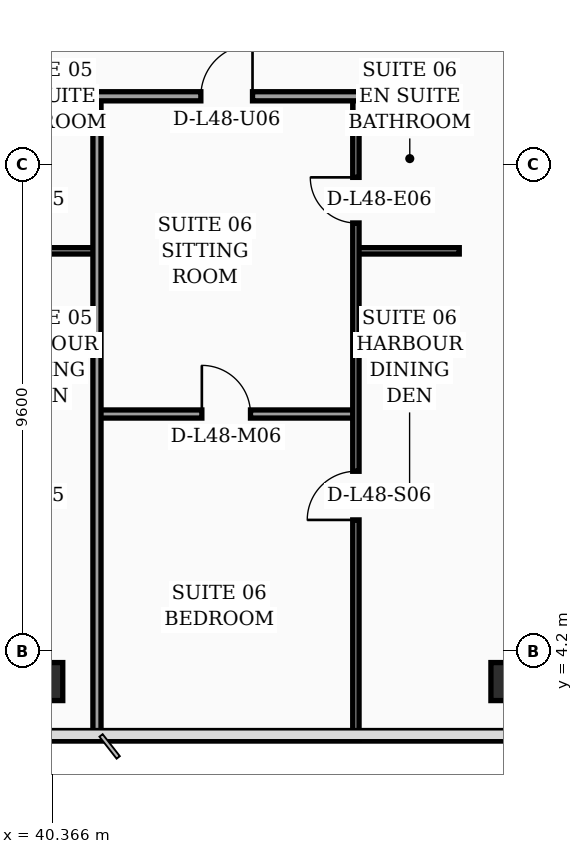
"""IFC4 building model, lengths in metres.
Left out: names, types, materials, properties, quantities, classifications, styles, units other than length and angle.
Written with IfcOpenShell. Run it as: python <this file> out.ifc"""

import sys

from ifc_helpers import new_model, si_unit, direction, frame, frame_2d, origin, origin_2d, place, context, subcontext, project, spatial, rectangle, hollow_rectangle, extrude, element, fill, save


model = new_model("IFC4")
c1 = context("Model", 3, precision=1e-05, world=origin(), true_north=direction((0.0, 1.0)))
c2 = subcontext(c1, "Body", "Model", "MODEL_VIEW")
j1 = project(units=[si_unit("LENGTHUNIT", "METRE"), si_unit("PLANEANGLEUNIT", "RADIAN")], contexts=[c1])
p1 = place(None, origin())
s1 = spatial("IfcSite", under=j1, at=p1, CompositionType="ELEMENT")
p2 = place(p1, origin())
s2 = spatial("IfcBuilding", under=s1, at=p2, CompositionType="ELEMENT")
p3 = place(p2, frame((0.0, 0.0, 195.1)))
s3 = spatial("IfcBuildingStorey", under=s2, at=p3, CompositionType="ELEMENT", Elevation=195.1)
for number, where, z_axis, x_axis in (
    (1, (40.2, 3.6, 0.0), (0.0, 0.0, 1.0), (1.0, 0.0, 0.0)),
    (2, (49.4, 3.6, 0.0), (0.0, 0.0, 1.0), (1.0, 0.0, 0.0)),
):
    element("IfcColumn", number, at=place(p3, frame(where, z_axis=z_axis, x_axis=x_axis)), inside=s3, PredefinedType="COLUMN", context=c2, shape_type="SweptSolid", body=[
        extrude(hollow_rectangle(XDim=0.75, YDim=0.75, WallThickness=0.032, at=origin_2d()), origin(), (0.0, 0.0, 1.0), 4.05),
    ])
p4 = place(p3, frame((55.03, 5.505, 0.0), z_axis=(0.0, 0.0, 1.0), x_axis=(-0.300509063924, 0.953778958931, 0.0)))
e3 = element("IfcWall", 3, at=p4, inside=s3, PredefinedType="SOLIDWALL", context=c2, shape_type="SweptSolid", body=[
    extrude(rectangle(XDim=30.814, YDim=0.32, at=frame_2d((15.407, 0.0))), origin(), (0.0, 0.0, 1.0), 4.05),
])
p5 = place(p4, frame((4.747, 0.0, 0.0)))
e4 = element("IfcOpeningElement", 4, at=p5, cuts=e3, PredefinedType="OPENING", context=c2, shape_type="SweptSolid", body=[
    extrude(rectangle(XDim=1.4, YDim=2.25, at=frame_2d((0.7, 1.125))), frame((0.0, 0.17, 0.0), z_axis=(0.0, -1.0, 0.0), x_axis=(1.0, 0.0, 0.0)), (0.0, 0.0, 1.0), 0.34),
])
p6 = place(p4, frame((9.889, 0.0, 0.7)))
e5 = element("IfcOpeningElement", 5, at=p6, cuts=e3, PredefinedType="OPENING", context=c2, shape_type="SweptSolid", body=[
    extrude(rectangle(XDim=1.6, YDim=1.65, at=frame_2d((0.8, 0.825))), frame((0.0, 0.17, 0.0), z_axis=(0.0, -1.0, 0.0), x_axis=(1.0, 0.0, 0.0)), (0.0, 0.0, 1.0), 0.34),
])
p7 = place(p4, frame((18.696, 0.0, 0.7)))
e6 = element("IfcOpeningElement", 6, at=p7, cuts=e3, PredefinedType="OPENING", context=c2, shape_type="SweptSolid", body=[
    extrude(rectangle(XDim=1.6, YDim=1.65, at=frame_2d((0.8, 0.825))), frame((0.0, 0.17, 0.0), z_axis=(0.0, -1.0, 0.0), x_axis=(1.0, 0.0, 0.0)), (0.0, 0.0, 1.0), 0.34),
])
p8 = place(p4, frame((1.6, 0.0, 0.75)))
e7 = element("IfcOpeningElement", 7, at=p8, cuts=e3, PredefinedType="OPENING", context=c2, shape_type="SweptSolid", body=[
    extrude(rectangle(XDim=1.5, YDim=1.6, at=frame_2d((0.75, 0.8))), frame((0.0, 0.17, 0.0), z_axis=(0.0, -1.0, 0.0), x_axis=(1.0, 0.0, 0.0)), (0.0, 0.0, 1.0), 0.34),
])
p9 = place(p4, frame((7.8, 0.0, 0.75)))
e8 = element("IfcOpeningElement", 8, at=p9, cuts=e3, PredefinedType="OPENING", context=c2, shape_type="SweptSolid", body=[
    extrude(rectangle(XDim=1.5, YDim=1.6, at=frame_2d((0.75, 0.8))), frame((0.0, 0.17, 0.0), z_axis=(0.0, -1.0, 0.0), x_axis=(1.0, 0.0, 0.0)), (0.0, 0.0, 1.0), 0.34),
])
p10 = place(p4, frame((11.95, 0.0, 0.75)))
e9 = element("IfcOpeningElement", 9, at=p10, cuts=e3, PredefinedType="OPENING", context=c2, shape_type="SweptSolid", body=[
    extrude(rectangle(XDim=1.5, YDim=1.6, at=frame_2d((0.75, 0.8))), frame((0.0, 0.17, 0.0), z_axis=(0.0, -1.0, 0.0), x_axis=(1.0, 0.0, 0.0)), (0.0, 0.0, 1.0), 0.34),
])
p11 = place(p4, frame((14.0, 0.0, 0.75)))
e10 = element("IfcOpeningElement", 10, at=p11, cuts=e3, PredefinedType="OPENING", context=c2, shape_type="SweptSolid", body=[
    extrude(rectangle(XDim=1.5, YDim=1.6, at=frame_2d((0.75, 0.8))), frame((0.0, 0.17, 0.0), z_axis=(0.0, -1.0, 0.0), x_axis=(1.0, 0.0, 0.0)), (0.0, 0.0, 1.0), 0.34),
])
p12 = place(p4, frame((16.55, 0.0, 0.75)))
e11 = element("IfcOpeningElement", 11, at=p12, cuts=e3, PredefinedType="OPENING", context=c2, shape_type="SweptSolid", body=[
    extrude(rectangle(XDim=1.5, YDim=1.6, at=frame_2d((0.75, 0.8))), frame((0.0, 0.17, 0.0), z_axis=(0.0, -1.0, 0.0), x_axis=(1.0, 0.0, 0.0)), (0.0, 0.0, 1.0), 0.34),
])
p13 = place(p4, frame((20.75, 0.0, 0.75)))
e12 = element("IfcOpeningElement", 12, at=p13, cuts=e3, PredefinedType="OPENING", context=c2, shape_type="SweptSolid", body=[
    extrude(rectangle(XDim=1.5, YDim=1.6, at=frame_2d((0.75, 0.8))), frame((0.0, 0.17, 0.0), z_axis=(0.0, -1.0, 0.0), x_axis=(1.0, 0.0, 0.0)), (0.0, 0.0, 1.0), 0.34),
])
p14 = place(p4, frame((23.3, 0.0, 0.75)))
e13 = element("IfcOpeningElement", 13, at=p14, cuts=e3, PredefinedType="OPENING", context=c2, shape_type="SweptSolid", body=[
    extrude(rectangle(XDim=1.5, YDim=1.6, at=frame_2d((0.75, 0.8))), frame((0.0, 0.17, 0.0), z_axis=(0.0, -1.0, 0.0), x_axis=(1.0, 0.0, 0.0)), (0.0, 0.0, 1.0), 0.34),
])
p15 = place(p4, frame((26.4, 0.0, 0.75)))
e14 = element("IfcOpeningElement", 14, at=p15, cuts=e3, PredefinedType="OPENING", context=c2, shape_type="SweptSolid", body=[
    extrude(rectangle(XDim=1.5, YDim=1.6, at=frame_2d((0.75, 0.8))), frame((0.0, 0.17, 0.0), z_axis=(0.0, -1.0, 0.0), x_axis=(1.0, 0.0, 0.0)), (0.0, 0.0, 1.0), 0.34),
])
p16 = place(p3, frame((39.12, 12.1, 0.0), z_axis=(0.0, 0.0, 1.0), x_axis=(1.0, 0.0, 0.0)))
e15 = element("IfcWall", 15, at=p16, inside=s3, PredefinedType="PARTITIONING", context=c2, shape_type="SweptSolid", body=[
    extrude(rectangle(XDim=2.13, YDim=0.125, at=frame_2d((1.065, 0.0))), origin(), (0.0, 0.0, 1.0), 4.05),
])
p17 = place(p3, frame((46.36, 12.1, 0.0), z_axis=(0.0, 0.0, 1.0), x_axis=(1.0, 0.0, 0.0)))
e16 = element("IfcWall", 16, at=p17, inside=s3, PredefinedType="PARTITIONING", context=c2, shape_type="SweptSolid", body=[
    extrude(rectangle(XDim=2.04, YDim=0.125, at=frame_2d((1.02, 0.0))), origin(), (0.0, 0.0, 1.0), 4.05),
])
p18 = place(p3, frame((41.25, 8.88, 0.0), z_axis=(0.0, 0.0, 1.0), x_axis=(1.0, 0.0, 0.0)))
e17 = element("IfcWall", 17, at=p18, inside=s3, PredefinedType="PARTITIONING", context=c2, shape_type="SweptSolid", body=[
    extrude(rectangle(XDim=5.11, YDim=0.16, at=frame_2d((2.555, 0.0))), origin(), (0.0, 0.0, 1.0), 4.05),
])
p19 = place(p18, frame((2.07, 0.0, 0.0)))
e18 = element("IfcOpeningElement", 18, at=p19, cuts=e17, PredefinedType="OPENING", context=c2, shape_type="SweptSolid", body=[
    extrude(rectangle(XDim=0.96, YDim=2.2, at=frame_2d((0.48, 1.1))), frame((0.0, 0.09, 0.0), z_axis=(0.0, -1.0, 0.0), x_axis=(1.0, 0.0, 0.0)), (0.0, 0.0, 1.0), 0.18),
])
p20 = place(p3, frame((46.36, 2.44, 0.0), z_axis=(0.0, 0.0, 1.0), x_axis=(0.0, 1.0, 0.0)))
e19 = element("IfcWall", 19, at=p20, inside=s3, PredefinedType="PARTITIONING", context=c2, shape_type="SweptSolid", body=[
    extrude(rectangle(XDim=12.71, YDim=0.125, at=frame_2d((6.355, 0.0))), origin(), (0.0, 0.0, 1.0), 2.35),
])
p21 = place(p20, frame((4.35, 0.0, 0.0)))
e20 = element("IfcOpeningElement", 20, at=p21, cuts=e19, PredefinedType="OPENING", context=c2, shape_type="SweptSolid", body=[
    extrude(rectangle(XDim=0.96, YDim=2.2, at=frame_2d((0.48, 1.1))), frame((0.0, 0.073, 0.0), z_axis=(0.0, -1.0, 0.0), x_axis=(1.0, 0.0, 0.0)), (0.0, 0.0, 1.0), 0.145),
])
p22 = place(p20, frame((10.21, 0.0, 0.0)))
e21 = element("IfcOpeningElement", 21, at=p22, cuts=e19, PredefinedType="OPENING", context=c2, shape_type="SweptSolid", body=[
    extrude(rectangle(XDim=0.9, YDim=2.15, at=frame_2d((0.45, 1.075))), frame((0.0, 0.073, 0.0), z_axis=(0.0, -1.0, 0.0), x_axis=(1.0, 0.0, 0.0)), (0.0, 0.0, 1.0), 0.145),
])
p23 = place(p3, frame((41.25, 2.44, 0.0), z_axis=(0.0, 0.0, 1.0), x_axis=(0.0, 1.0, 0.0)))
e22 = element("IfcWall", 22, at=p23, inside=s3, PredefinedType="PARTITIONING", context=c2, shape_type="SweptSolid", body=[
    extrude(rectangle(XDim=12.71, YDim=0.16, at=frame_2d((6.355, 0.0))), origin(), (0.0, 0.0, 1.0), 2.35),
])
p24 = place(p3, frame((32.4, 15.15, 0.0), z_axis=(0.0, 0.0, 1.0), x_axis=(1.0, 0.0, 0.0)))
e23 = element("IfcWall", 23, at=p24, inside=s3, PredefinedType="PARTITIONING", context=c2, shape_type="SweptSolid", body=[
    extrude(rectangle(XDim=16.0, YDim=0.18, at=frame_2d((8.0, 0.0))), origin(), (0.0, 0.0, 1.0), 2.35),
])
p25 = place(p24, frame((2.95, 0.0, 0.0)))
e24 = element("IfcOpeningElement", 24, at=p25, cuts=e23, PredefinedType="OPENING", context=c2, shape_type="SweptSolid", body=[
    extrude(rectangle(XDim=1.02, YDim=2.2, at=frame_2d((0.51, 1.1))), frame((0.0, 0.1, 0.0), z_axis=(0.0, -1.0, 0.0), x_axis=(1.0, 0.0, 0.0)), (0.0, 0.0, 1.0), 0.2),
])
p26 = place(p24, frame((10.9, 0.0, 0.0)))
e25 = element("IfcOpeningElement", 25, at=p26, cuts=e23, PredefinedType="OPENING", context=c2, shape_type="SweptSolid", body=[
    extrude(rectangle(XDim=1.02, YDim=2.2, at=frame_2d((0.51, 1.1))), frame((0.0, 0.1, 0.0), z_axis=(0.0, -1.0, 0.0), x_axis=(1.0, 0.0, 0.0)), (0.0, 0.0, 1.0), 0.2),
])
p27 = place(p19, origin())
e26 = element("IfcDoor", 26, at=p27, inside=s3, OperationType="SINGLE_SWING_LEFT", PredefinedType="DOOR", context=c2, shape_type="SweptSolid", body=[
    extrude(rectangle(XDim=0.96, YDim=2.2, at=frame_2d((0.48, 1.1))), frame((0.0, 0.025, 0.0), z_axis=(0.0, -1.0, 0.0), x_axis=(1.0, 0.0, 0.0)), (0.0, 0.0, 1.0), 0.05),
])
fill(e18, e26)
p28 = place(p21, origin())
e27 = element("IfcDoor", 27, at=p28, inside=s3, OperationType="SINGLE_SWING_LEFT", PredefinedType="DOOR", context=c2, shape_type="SweptSolid", body=[
    extrude(rectangle(XDim=0.96, YDim=2.2, at=frame_2d((0.48, 1.1))), frame((0.0, 0.025, 0.0), z_axis=(0.0, -1.0, 0.0), x_axis=(1.0, 0.0, 0.0)), (0.0, 0.0, 1.0), 0.05),
])
fill(e20, e27)
p29 = place(p22, origin())
e28 = element("IfcDoor", 28, at=p29, inside=s3, OperationType="SINGLE_SWING_RIGHT", PredefinedType="DOOR", context=c2, shape_type="SweptSolid", body=[
    extrude(rectangle(XDim=0.9, YDim=2.15, at=frame_2d((0.45, 1.075))), frame((0.0, 0.025, 0.0), z_axis=(0.0, -1.0, 0.0), x_axis=(1.0, 0.0, 0.0)), (0.0, 0.0, 1.0), 0.05),
])
fill(e21, e28)
p30 = place(p26, origin())
e29 = element("IfcDoor", 29, at=p30, inside=s3, OperationType="SINGLE_SWING_RIGHT", PredefinedType="DOOR", context=c2, shape_type="SweptSolid", body=[
    extrude(rectangle(XDim=1.02, YDim=2.2, at=frame_2d((0.51, 1.1))), frame((0.0, 0.025, 0.0), z_axis=(0.0, -1.0, 0.0), x_axis=(1.0, 0.0, 0.0)), (0.0, 0.0, 1.0), 0.05),
])
fill(e25, e29)
save(model, sys.argv[1])
